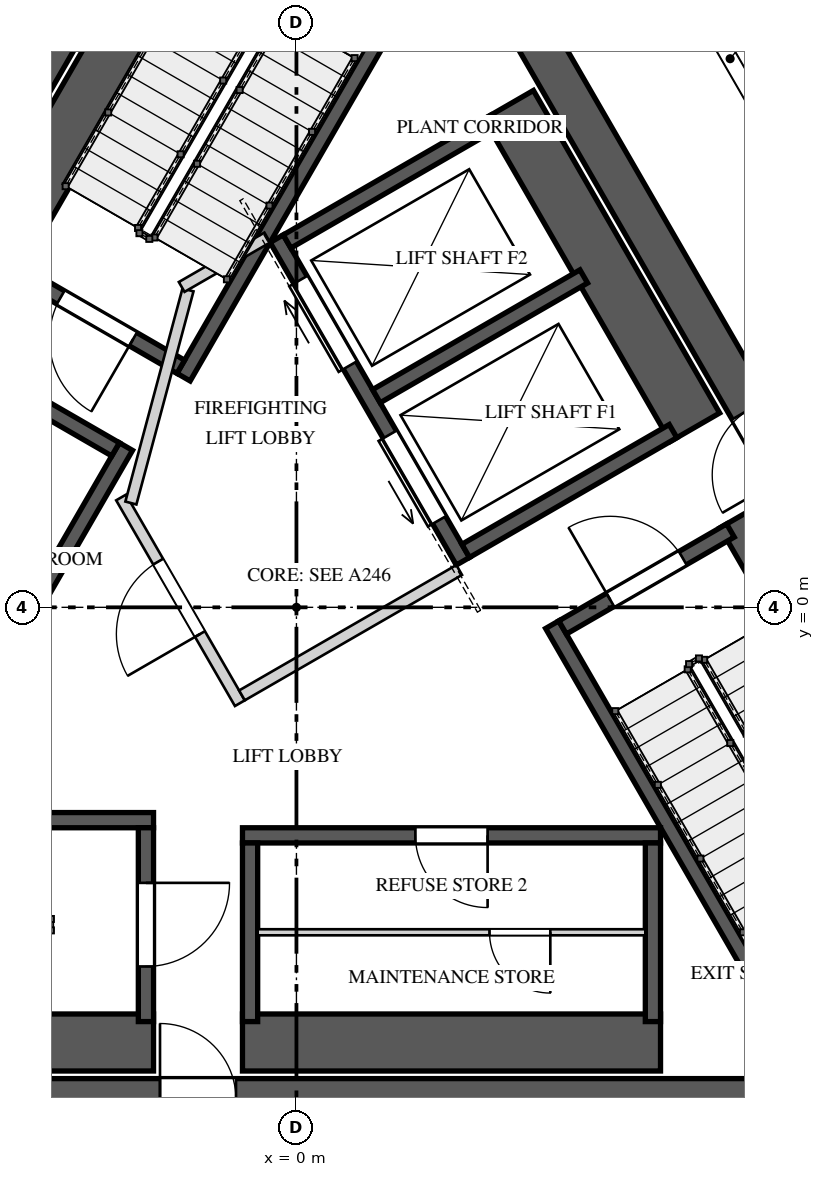
"""IFC4 building model, lengths in metres.
Left out: names, types, materials, properties, quantities, classifications, styles, units other than length and angle.
Written with IfcOpenShell. Run it as: python <this file> out.ifc"""

import sys

from ifc_helpers import new_model, si_unit, direction, frame, frame_2d, origin, place, context, subcontext, project, spatial, polyline, rectangle, outline, extrude, element, fill, save


model = new_model("IFC4")
c1 = context("Model", 3, precision=1e-05, world=origin(), true_north=direction((0.0, 1.0)))
c2 = subcontext(c1, "Body", "Model", "MODEL_VIEW")
j1 = project(units=[si_unit("LENGTHUNIT", "METRE"), si_unit("PLANEANGLEUNIT", "RADIAN")], contexts=[c1])
p1 = place(None, origin())
s1 = spatial("IfcSite", under=j1, at=p1, CompositionType="ELEMENT")
p2 = place(p1, origin())
s2 = spatial("IfcBuilding", under=s1, at=p2, CompositionType="ELEMENT")
p3 = place(p2, frame((0.0, 0.0, 356.9)))
s3 = spatial("IfcBuildingStorey", under=s2, at=p3, CompositionType="ELEMENT", Elevation=356.9)
p4 = place(p3, frame((-1.285, 10.725, 0.0), z_axis=(0.0, 0.0, 1.0), x_axis=(-0.499994590896, -0.86602852671, 0.0)))
e1 = element("IfcWall", 1, at=p4, inside=s3, PredefinedType="SHEAR", context=c2, shape_type="SweptSolid", body=[
    extrude(rectangle(XDim=17.292, YDim=0.55, at=frame_2d((8.646, 0.0))), origin(), (0.0, 0.0, 1.0), 4.5),
])
p5 = place(p4, frame((6.851, 0.0, 0.0)))
e2 = element("IfcOpeningElement", 2, at=p5, cuts=e1, PredefinedType="OPENING", context=c2, shape_type="SweptSolid", body=[
    extrude(rectangle(XDim=1.0, YDim=2.4, at=frame_2d((0.5, 1.2))), frame((0.0, 0.285, 0.0), z_axis=(0.0, -1.0, 0.0), x_axis=(1.0, 0.0, 0.0)), (0.0, 0.0, 1.0), 0.57),
])
p6 = place(p4, frame((15.089, 0.0, 0.0)))
e3 = element("IfcOpeningElement", 3, at=p6, cuts=e1, PredefinedType="OPENING", context=c2, shape_type="SweptSolid", body=[
    extrude(rectangle(XDim=0.8, YDim=2.1, at=frame_2d((0.4, 1.05))), frame((0.0, 0.285, 0.0), z_axis=(0.0, -1.0, 0.0), x_axis=(1.0, 0.0, 0.0)), (0.0, 0.0, 1.0), 0.57),
])
p7 = place(p3, frame((-8.646, -6.475, 0.0), z_axis=(0.0, 0.0, 1.0), x_axis=(1.0, 0.0, 0.0)))
e4 = element("IfcWall", 4, at=p7, inside=s3, PredefinedType="SHEAR", context=c2, shape_type="SweptSolid", body=[
    extrude(rectangle(XDim=17.292, YDim=0.55, at=frame_2d((8.646, 0.0))), origin(), (0.0, 0.0, 1.0), 4.5),
])
p8 = place(p7, frame((6.851, 0.0, 0.0)))
e5 = element("IfcOpeningElement", 5, at=p8, cuts=e4, PredefinedType="OPENING", context=c2, shape_type="SweptSolid", body=[
    extrude(rectangle(XDim=1.0, YDim=2.4, at=frame_2d((0.5, 1.2))), frame((0.0, 0.285, 0.0), z_axis=(0.0, -1.0, 0.0), x_axis=(1.0, 0.0, 0.0)), (0.0, 0.0, 1.0), 0.57),
])
p9 = place(p7, frame((15.089, 0.0, 0.0)))
e6 = element("IfcOpeningElement", 6, at=p9, cuts=e4, PredefinedType="OPENING", context=c2, shape_type="SweptSolid", body=[
    extrude(rectangle(XDim=0.8, YDim=2.1, at=frame_2d((0.4, 1.05))), frame((0.0, 0.285, 0.0), z_axis=(0.0, -1.0, 0.0), x_axis=(1.0, 0.0, 0.0)), (0.0, 0.0, 1.0), 0.57),
])
p10 = place(p3, frame((9.93, -4.25, 0.0), z_axis=(0.0, 0.0, 1.0), x_axis=(-0.499994590896, 0.86602852671, 0.0)))
e7 = element("IfcWall", 7, at=p10, inside=s3, PredefinedType="SHEAR", context=c2, shape_type="SweptSolid", body=[
    extrude(rectangle(XDim=17.292, YDim=0.55, at=frame_2d((8.646, 0.0))), origin(), (0.0, 0.0, 1.0), 4.5),
])
p11 = place(p10, frame((6.921, 0.0, 0.0)))
e8 = element("IfcOpeningElement", 8, at=p11, cuts=e7, PredefinedType="OPENING", context=c2, shape_type="SweptSolid", body=[
    extrude(rectangle(XDim=1.0, YDim=2.4, at=frame_2d((0.5, 1.2))), frame((0.0, 0.285, 0.0), z_axis=(0.0, -1.0, 0.0), x_axis=(1.0, 0.0, 0.0)), (0.0, 0.0, 1.0), 0.57),
])
p12 = place(p3, frame((-0.918, 9.86, 0.0), z_axis=(0.0, 0.0, 1.0), x_axis=(-0.500026960575, -0.86600983753, 0.0)))
e9 = element("IfcWall", 9, at=p12, inside=s3, PredefinedType="SOLIDWALL", context=c2, shape_type="SweptSolid", body=[
    extrude(rectangle(XDim=6.2, YDim=0.75, at=frame_2d((3.1, 0.0))), origin(), (0.0, 0.0, 1.0), 4.15),
])
p13 = place(p3, frame((1.615, 8.397, 0.0), z_axis=(0.0, 0.0, 1.0), x_axis=(-0.500009909098, -0.866019682689, 0.0)))
e10 = element("IfcWall", 10, at=p13, inside=s3, PredefinedType="SOLIDWALL", context=c2, shape_type="SweptSolid", body=[
    extrude(rectangle(XDim=6.2, YDim=0.2, at=frame_2d((3.1, 0.0))), origin(), (0.0, 0.0, 1.0), 4.15),
])
p14 = place(p3, frame((-1.521, 3.165, 0.0), z_axis=(0.0, 0.0, 1.0), x_axis=(-0.866030925526, 0.499990435942, 0.0)))
e11 = element("IfcWall", 11, at=p14, inside=s3, PredefinedType="SOLIDWALL", context=c2, shape_type="SweptSolid", body=[
    extrude(rectangle(XDim=2.55, YDim=0.2, at=frame_2d((1.275, 0.0))), origin(), (0.0, 0.0, 1.0), 4.15),
])
p15 = place(p14, frame((0.725, 0.0, 0.0)))
e12 = element("IfcOpeningElement", 12, at=p15, cuts=e11, PredefinedType="OPENING", context=c2, shape_type="SweptSolid", body=[
    extrude(rectangle(XDim=1.1, YDim=2.4, at=frame_2d((0.55, 1.2))), frame((0.0, 0.11, 0.0), z_axis=(0.0, -1.0, 0.0), x_axis=(1.0, 0.0, 0.0)), (0.0, 0.0, 1.0), 0.22),
])
p16 = place(p3, frame((-8.08, -5.725, 0.0), z_axis=(0.0, 0.0, 1.0), x_axis=(1.0, 0.0, 0.0)))
e13 = element("IfcWall", 13, at=p16, inside=s3, PredefinedType="SOLIDWALL", context=c2, shape_type="SweptSolid", body=[
    extrude(rectangle(XDim=6.2, YDim=0.75, at=frame_2d((3.1, 0.0))), origin(), (0.0, 0.0, 1.0), 4.15),
])
p17 = place(p3, frame((-8.08, -2.8, 0.0), z_axis=(0.0, 0.0, 1.0), x_axis=(1.0, 0.0, 0.0)))
e14 = element("IfcWall", 14, at=p17, inside=s3, PredefinedType="SOLIDWALL", context=c2, shape_type="SweptSolid", body=[
    extrude(rectangle(XDim=6.2, YDim=0.2, at=frame_2d((3.1, 0.0))), origin(), (0.0, 0.0, 1.0), 4.15),
])
p18 = place(p3, frame((-1.98, -2.9, 0.0), z_axis=(0.0, 0.0, 1.0), x_axis=(0.0, -1.0, 0.0)))
e15 = element("IfcWall", 15, at=p18, inside=s3, PredefinedType="SOLIDWALL", context=c2, shape_type="SweptSolid", body=[
    extrude(rectangle(XDim=2.55, YDim=0.2, at=frame_2d((1.275, 0.0))), origin(), (0.0, 0.0, 1.0), 4.15),
])
p19 = place(p18, frame((0.725, 0.0, 0.0)))
e16 = element("IfcOpeningElement", 16, at=p19, cuts=e15, PredefinedType="OPENING", context=c2, shape_type="SweptSolid", body=[
    extrude(rectangle(XDim=1.1, YDim=2.4, at=frame_2d((0.55, 1.2))), frame((0.0, 0.11, 0.0), z_axis=(0.0, -1.0, 0.0), x_axis=(1.0, 0.0, 0.0)), (0.0, 0.0, 1.0), 0.22),
])
p20 = place(p3, frame((8.998, -4.135, 0.0), z_axis=(0.0, 0.0, 1.0), x_axis=(-0.500009909098, 0.866019682689, 0.0)))
e17 = element("IfcWall", 17, at=p20, inside=s3, PredefinedType="SOLIDWALL", context=c2, shape_type="SweptSolid", body=[
    extrude(rectangle(XDim=6.2, YDim=0.75, at=frame_2d((3.1, 0.0))), origin(), (0.0, 0.0, 1.0), 4.15),
])
p21 = place(p3, frame((6.465, -5.597, 0.0), z_axis=(0.0, 0.0, 1.0), x_axis=(-0.49998037582, 0.866036733513, 0.0)))
e18 = element("IfcWall", 18, at=p21, inside=s3, PredefinedType="SOLIDWALL", context=c2, shape_type="SweptSolid", body=[
    extrude(rectangle(XDim=6.2, YDim=0.2, at=frame_2d((3.1, 0.0))), origin(), (0.0, 0.0, 1.0), 4.15),
])
p22 = place(p3, frame((3.501, -0.265, 0.0), z_axis=(0.0, 0.0, 1.0), x_axis=(0.866030925526, 0.499990435942, 0.0)))
e19 = element("IfcWall", 19, at=p22, inside=s3, PredefinedType="SOLIDWALL", context=c2, shape_type="SweptSolid", body=[
    extrude(rectangle(XDim=2.55, YDim=0.2, at=frame_2d((1.275, 0.0))), origin(), (0.0, 0.0, 1.0), 4.15),
])
p23 = place(p22, frame((0.725, 0.0, 0.0)))
e20 = element("IfcOpeningElement", 20, at=p23, cuts=e19, PredefinedType="OPENING", context=c2, shape_type="SweptSolid", body=[
    extrude(rectangle(XDim=1.1, YDim=2.4, at=frame_2d((0.55, 1.2))), frame((0.0, 0.11, 0.0), z_axis=(0.0, -1.0, 0.0), x_axis=(1.0, 0.0, 0.0)), (0.0, 0.0, 1.0), 0.22),
])
p24 = place(p3, frame((-4.993, -2.648, 0.0), z_axis=(0.0, 0.0, 1.0), x_axis=(0.499996545922, 0.866027397988, 0.0)))
e21 = element("IfcWall", 21, at=p24, inside=s3, PredefinedType="SOLIDWALL", context=c2, shape_type="SweptSolid", body=[
    extrude(rectangle(XDim=5.5, YDim=0.2, at=frame_2d((2.75, 0.0))), origin(), (0.0, 0.0, 1.0), 4.15),
])
p25 = place(p24, frame((2.275, 0.0, 0.0)))
e22 = element("IfcOpeningElement", 22, at=p25, cuts=e21, PredefinedType="OPENING", context=c2, shape_type="SweptSolid", body=[
    extrude(rectangle(XDim=0.95, YDim=2.4, at=frame_2d((0.475, 1.2))), frame((0.0, 0.11, 0.0), z_axis=(0.0, -1.0, 0.0), x_axis=(1.0, 0.0, 0.0)), (0.0, 0.0, 1.0), 0.22),
])
p26 = place(p3, frame((-2.38, 2.078, 0.0), z_axis=(0.0, 0.0, 1.0), x_axis=(-0.866061024631, 0.499938297808, 0.0)))
e23 = element("IfcWall", 23, at=p26, inside=s3, PredefinedType="SOLIDWALL", context=c2, shape_type="SweptSolid", body=[
    extrude(rectangle(XDim=2.35, YDim=0.2, at=frame_2d((1.175, 0.0))), origin(), (0.0, 0.0, 1.0), 4.15),
])
p27 = place(p3, frame((4.79, -3.0, 0.0), z_axis=(0.0, 0.0, 1.0), x_axis=(-1.0, 0.0, 0.0)))
e24 = element("IfcWall", 24, at=p27, inside=s3, PredefinedType="SOLIDWALL", context=c2, shape_type="SweptSolid", body=[
    extrude(rectangle(XDim=5.5, YDim=0.2, at=frame_2d((2.75, 0.0))), origin(), (0.0, 0.0, 1.0), 4.15),
])
p28 = place(p27, frame((2.275, 0.0, 0.0)))
e25 = element("IfcOpeningElement", 25, at=p28, cuts=e24, PredefinedType="OPENING", context=c2, shape_type="SweptSolid", body=[
    extrude(rectangle(XDim=0.95, YDim=2.4, at=frame_2d((0.475, 1.2))), frame((0.0, 0.11, 0.0), z_axis=(0.0, -1.0, 0.0), x_axis=(1.0, 0.0, 0.0)), (0.0, 0.0, 1.0), 0.22),
])
p29 = place(p3, frame((-0.71, -5.725, 0.0), z_axis=(0.0, 0.0, 1.0), x_axis=(1.0, 0.0, 0.0)))
e26 = element("IfcWall", 26, at=p29, inside=s3, PredefinedType="SOLIDWALL", context=c2, shape_type="SweptSolid", body=[
    extrude(rectangle(XDim=5.5, YDim=0.75, at=frame_2d((2.75, 0.0))), origin(), (0.0, 0.0, 1.0), 4.15),
])
for number, where, z_axis, x_axis in (
    (27, (-0.61, -3.1, 0.0), (0.0, 0.0, 1.0), (0.0, -1.0, 0.0)),
    (28, (4.69, -3.1, 0.0), (0.0, 0.0, 1.0), (0.0, -1.0, 0.0)),
):
    element("IfcWall", number, at=place(p3, frame(where, z_axis=z_axis, x_axis=x_axis)), inside=s3, PredefinedType="SOLIDWALL", context=c2, shape_type="SweptSolid", body=[
        extrude(rectangle(XDim=2.35, YDim=0.2, at=frame_2d((1.175, 0.0))), origin(), (0.0, 0.0, 1.0), 4.15),
    ])
p30 = place(p3, frame((4.59, -4.275, 0.0), z_axis=(0.0, 0.0, 1.0), x_axis=(-1.0, 0.0, 0.0)))
e29 = element("IfcWall", 29, at=p30, inside=s3, PredefinedType="PARTITIONING", context=c2, shape_type="SweptSolid", body=[
    extrude(rectangle(XDim=5.1, YDim=0.08, at=frame_2d((2.55, 0.0))), origin(), (0.0, 0.0, 1.0), 4.15),
])
p31 = place(p30, frame((1.25, 0.0, 0.0)))
e30 = element("IfcOpeningElement", 30, at=p31, cuts=e29, PredefinedType="OPENING", context=c2, shape_type="SweptSolid", body=[
    extrude(rectangle(XDim=0.8, YDim=2.1, at=frame_2d((0.4, 1.05))), frame((0.0, 0.05, 0.0), z_axis=(0.0, -1.0, 0.0), x_axis=(1.0, 0.0, 0.0)), (0.0, 0.0, 1.0), 0.1),
])
p32 = place(p3, frame((2.19, 0.606, 0.0), z_axis=(0.0, 0.0, 1.0), x_axis=(-0.500002801628, 0.866023786258, 0.0)))
e31 = element("IfcWall", 31, at=p32, inside=s3, PredefinedType="SOLIDWALL", context=c2, shape_type="SweptSolid", body=[
    extrude(rectangle(XDim=4.9, YDim=0.2, at=frame_2d((2.45, 0.0))), origin(), (0.0, 0.0, 1.0), 4.15),
])
p33 = place(p32, frame((0.625, 0.0, 0.0)))
e32 = element("IfcOpeningElement", 32, at=p33, cuts=e31, PredefinedType="OPENING", context=c2, shape_type="SweptSolid", body=[
    extrude(rectangle(XDim=1.3, YDim=2.1, at=frame_2d((0.65, 1.05))), frame((0.0, 0.11, 0.0), z_axis=(0.0, -1.0, 0.0), x_axis=(1.0, 0.0, 0.0)), (0.0, 0.0, 1.0), 0.22),
])
p34 = place(p32, frame((2.975, 0.0, 0.0)))
e33 = element("IfcOpeningElement", 33, at=p34, cuts=e31, PredefinedType="OPENING", context=c2, shape_type="SweptSolid", body=[
    extrude(rectangle(XDim=1.3, YDim=2.1, at=frame_2d((0.65, 1.05))), frame((0.0, 0.11, 0.0), z_axis=(0.0, -1.0, 0.0), x_axis=(1.0, 0.0, 0.0)), (0.0, 0.0, 1.0), 0.22),
])
p35 = place(p3, frame((5.243, 2.369, 0.0), z_axis=(0.0, 0.0, 1.0), x_axis=(-0.500002801628, 0.866023786258, 0.0)))
e34 = element("IfcWall", 34, at=p35, inside=s3, PredefinedType="SOLIDWALL", context=c2, shape_type="SweptSolid", body=[
    extrude(rectangle(XDim=4.9, YDim=0.75, at=frame_2d((2.45, 0.0))), origin(), (0.0, 0.0, 1.0), 4.15),
])
for number, where, z_axis, x_axis in (
    (35, (2.227, 0.743, 0.0), (0.0, 0.0, 1.0), (0.866, 0.5, 0.0)),
    (36, (1.052, 2.778, 0.0), (0.0, 0.0, 1.0), (0.866, 0.5, 0.0)),
    (37, (-0.123, 4.813, 0.0), (0.0, 0.0, 1.0), (0.866, 0.5, 0.0)),
):
    element("IfcWall", number, at=place(p3, frame(where, z_axis=z_axis, x_axis=x_axis)), inside=s3, PredefinedType="SOLIDWALL", context=c2, shape_type="SweptSolid", body=[
        extrude(rectangle(XDim=3.15, YDim=0.2, at=frame_2d((1.575, 0.0))), origin(), (0.0, 0.0, 1.0), 4.15),
    ])
p36 = place(p3, frame((-0.744, -1.261, 0.0), z_axis=(0.0, 0.0, 1.0), x_axis=(-0.500004234368, 0.866022959057, 0.0)))
e38 = element("IfcWall", 38, at=p36, inside=s3, PredefinedType="PARTITIONING", context=c2, shape_type="SweptSolid", body=[
    extrude(rectangle(XDim=3.125, YDim=0.15, at=frame_2d((1.562, 0.0))), origin(), (0.0, 0.0, 1.0), 4.15),
])
p37 = place(p36, frame((1.05, 0.0, 0.0)))
e39 = element("IfcOpeningElement", 39, at=p37, cuts=e38, PredefinedType="OPENING", context=c2, shape_type="SweptSolid", body=[
    extrude(rectangle(XDim=1.1, YDim=2.4, at=frame_2d((0.55, 1.2))), frame((0.0, 0.085, 0.0), z_axis=(0.0, -1.0, 0.0), x_axis=(1.0, 0.0, 0.0)), (0.0, 0.0, 1.0), 0.17),
])
p38 = place(p3, frame((-0.717, -1.159, 0.0), z_axis=(0.0, 0.0, 1.0), x_axis=(0.866008176907, 0.50002983664, 0.0)))
e40 = element("IfcWall", 40, at=p38, inside=s3, PredefinedType="PARTITIONING", context=c2, shape_type="SweptSolid", body=[
    extrude(rectangle(XDim=3.3, YDim=0.15, at=frame_2d((1.65, 0.0))), origin(), (0.0, 0.0, 1.0), 4.15),
])
p39 = place(p3, frame((-2.178, 1.372, 0.0), z_axis=(0.0, 0.0, 1.0), x_axis=(0.258808958833, 0.96592852884, 0.0)))
e41 = element("IfcWall", 41, at=p39, inside=s3, PredefinedType="PARTITIONING", context=c2, shape_type="SweptSolid", body=[
    extrude(rectangle(XDim=2.903, YDim=0.15, at=frame_2d((1.451, 0.0))), origin(), (0.0, 0.0, 1.0), 4.15),
])
p40 = place(p3, frame((-1.51, 4.215, 0.0), z_axis=(0.0, 0.0, 1.0), x_axis=(0.866085525409, 0.49989585183, 0.0)))
e42 = element("IfcWall", 42, at=p40, inside=s3, PredefinedType="PARTITIONING", context=c2, shape_type="SweptSolid", body=[
    extrude(rectangle(XDim=1.3, YDim=0.15, at=frame_2d((0.65, 0.0))), origin(), (0.0, 0.0, 1.0), 4.15),
])
p41 = place(p3, frame((5.406, 7.737, 0.0), z_axis=(0.0, 0.0, 1.0), x_axis=(0.500013151769, -0.866017810474, 0.0)))
e43 = element("IfcWall", 43, at=p41, inside=s3, PredefinedType="SOLIDWALL", context=c2, shape_type="SweptSolid", body=[
    extrude(outline(polyline([(0.0, 0.0), (1.769, 0.0), (1.769, 3.05), (0.825, 3.05), (0.825, 4.15), (0.0, 4.15), (0.0, 0.0)])), frame((0.0, 0.1, 0.0), z_axis=(0.0, -1.0, 0.0), x_axis=(1.0, 0.0, 0.0)), (0.0, 0.0, 1.0), 0.2),
])
p42 = place(p41, frame((0.05, 0.0, 0.0)))
e44 = element("IfcOpeningElement", 44, at=p42, cuts=e43, PredefinedType="OPENING", context=c2, shape_type="SweptSolid", body=[
    extrude(rectangle(XDim=1.1, YDim=2.4, at=frame_2d((0.55, 1.2))), frame((0.0, 0.11, 0.0), z_axis=(0.0, -1.0, 0.0), x_axis=(1.0, 0.0, 0.0)), (0.0, 0.0, 1.0), 0.22),
])
p43 = place(p15, origin())
e45 = element("IfcDoor", 45, at=p43, inside=s3, OperationType="SINGLE_SWING_RIGHT", PredefinedType="DOOR", context=c2, shape_type="SweptSolid", body=[
    extrude(rectangle(XDim=1.1, YDim=2.4, at=frame_2d((0.55, 1.2))), frame((0.0, 0.025, 0.0), z_axis=(0.0, -1.0, 0.0), x_axis=(1.0, 0.0, 0.0)), (0.0, 0.0, 1.0), 0.05),
])
fill(e12, e45)
p44 = place(p19, origin())
e46 = element("IfcDoor", 46, at=p44, inside=s3, OperationType="SINGLE_SWING_LEFT", PredefinedType="DOOR", context=c2, shape_type="SweptSolid", body=[
    extrude(rectangle(XDim=1.1, YDim=2.4, at=frame_2d((0.55, 1.2))), frame((0.0, 0.025, 0.0), z_axis=(0.0, -1.0, 0.0), x_axis=(1.0, 0.0, 0.0)), (0.0, 0.0, 1.0), 0.05),
])
fill(e16, e46)
p45 = place(p23, origin())
e47 = element("IfcDoor", 47, at=p45, inside=s3, OperationType="SINGLE_SWING_RIGHT", PredefinedType="DOOR", context=c2, shape_type="SweptSolid", body=[
    extrude(rectangle(XDim=1.1, YDim=2.4, at=frame_2d((0.55, 1.2))), frame((0.0, 0.025, 0.0), z_axis=(0.0, -1.0, 0.0), x_axis=(1.0, 0.0, 0.0)), (0.0, 0.0, 1.0), 0.05),
])
fill(e20, e47)
p46 = place(p28, origin())
e48 = element("IfcDoor", 48, at=p46, inside=s3, OperationType="SINGLE_SWING_LEFT", PredefinedType="DOOR", context=c2, shape_type="SweptSolid", body=[
    extrude(rectangle(XDim=0.95, YDim=2.4, at=frame_2d((0.475, 1.2))), frame((0.0, 0.025, 0.0), z_axis=(0.0, -1.0, 0.0), x_axis=(1.0, 0.0, 0.0)), (0.0, 0.0, 1.0), 0.05),
])
fill(e25, e48)
p47 = place(p31, origin())
e49 = element("IfcDoor", 49, at=p47, inside=s3, OperationType="SINGLE_SWING_RIGHT", PredefinedType="DOOR", context=c2, shape_type="SweptSolid", body=[
    extrude(rectangle(XDim=0.8, YDim=2.1, at=frame_2d((0.4, 1.05))), frame((0.0, 0.025, 0.0), z_axis=(0.0, -1.0, 0.0), x_axis=(1.0, 0.0, 0.0)), (0.0, 0.0, 1.0), 0.05),
])
fill(e30, e49)
p48 = place(p33, origin())
e50 = element("IfcDoor", 50, at=p48, inside=s3, OperationType="SLIDING_TO_LEFT", PredefinedType="DOOR", context=c2, shape_type="SweptSolid", body=[
    extrude(rectangle(XDim=1.3, YDim=2.1, at=frame_2d((0.65, 1.05))), frame((0.0, 0.025, 0.0), z_axis=(0.0, -1.0, 0.0), x_axis=(1.0, 0.0, 0.0)), (0.0, 0.0, 1.0), 0.05),
])
fill(e32, e50)
p49 = place(p34, origin())
e51 = element("IfcDoor", 51, at=p49, inside=s3, OperationType="SLIDING_TO_RIGHT", PredefinedType="DOOR", context=c2, shape_type="SweptSolid", body=[
    extrude(rectangle(XDim=1.3, YDim=2.1, at=frame_2d((0.65, 1.05))), frame((0.0, 0.025, 0.0), z_axis=(0.0, -1.0, 0.0), x_axis=(1.0, 0.0, 0.0)), (0.0, 0.0, 1.0), 0.05),
])
fill(e33, e51)
p50 = place(p37, origin())
e52 = element("IfcDoor", 52, at=p50, inside=s3, OperationType="SINGLE_SWING_LEFT", PredefinedType="DOOR", context=c2, shape_type="SweptSolid", body=[
    extrude(rectangle(XDim=1.1, YDim=2.4, at=frame_2d((0.55, 1.2))), frame((0.0, 0.025, 0.0), z_axis=(0.0, -1.0, 0.0), x_axis=(1.0, 0.0, 0.0)), (0.0, 0.0, 1.0), 0.05),
])
fill(e39, e52)
p51 = place(p42, origin())
e53 = element("IfcDoor", 53, at=p51, inside=s3, OperationType="SINGLE_SWING_LEFT", PredefinedType="DOOR", context=c2, shape_type="SweptSolid", body=[
    extrude(rectangle(XDim=1.1, YDim=2.4, at=frame_2d((0.55, 1.2))), frame((0.0, 0.025, 0.0), z_axis=(0.0, -1.0, 0.0), x_axis=(1.0, 0.0, 0.0)), (0.0, 0.0, 1.0), 0.05),
])
fill(e44, e53)
save(model, sys.argv[1])
